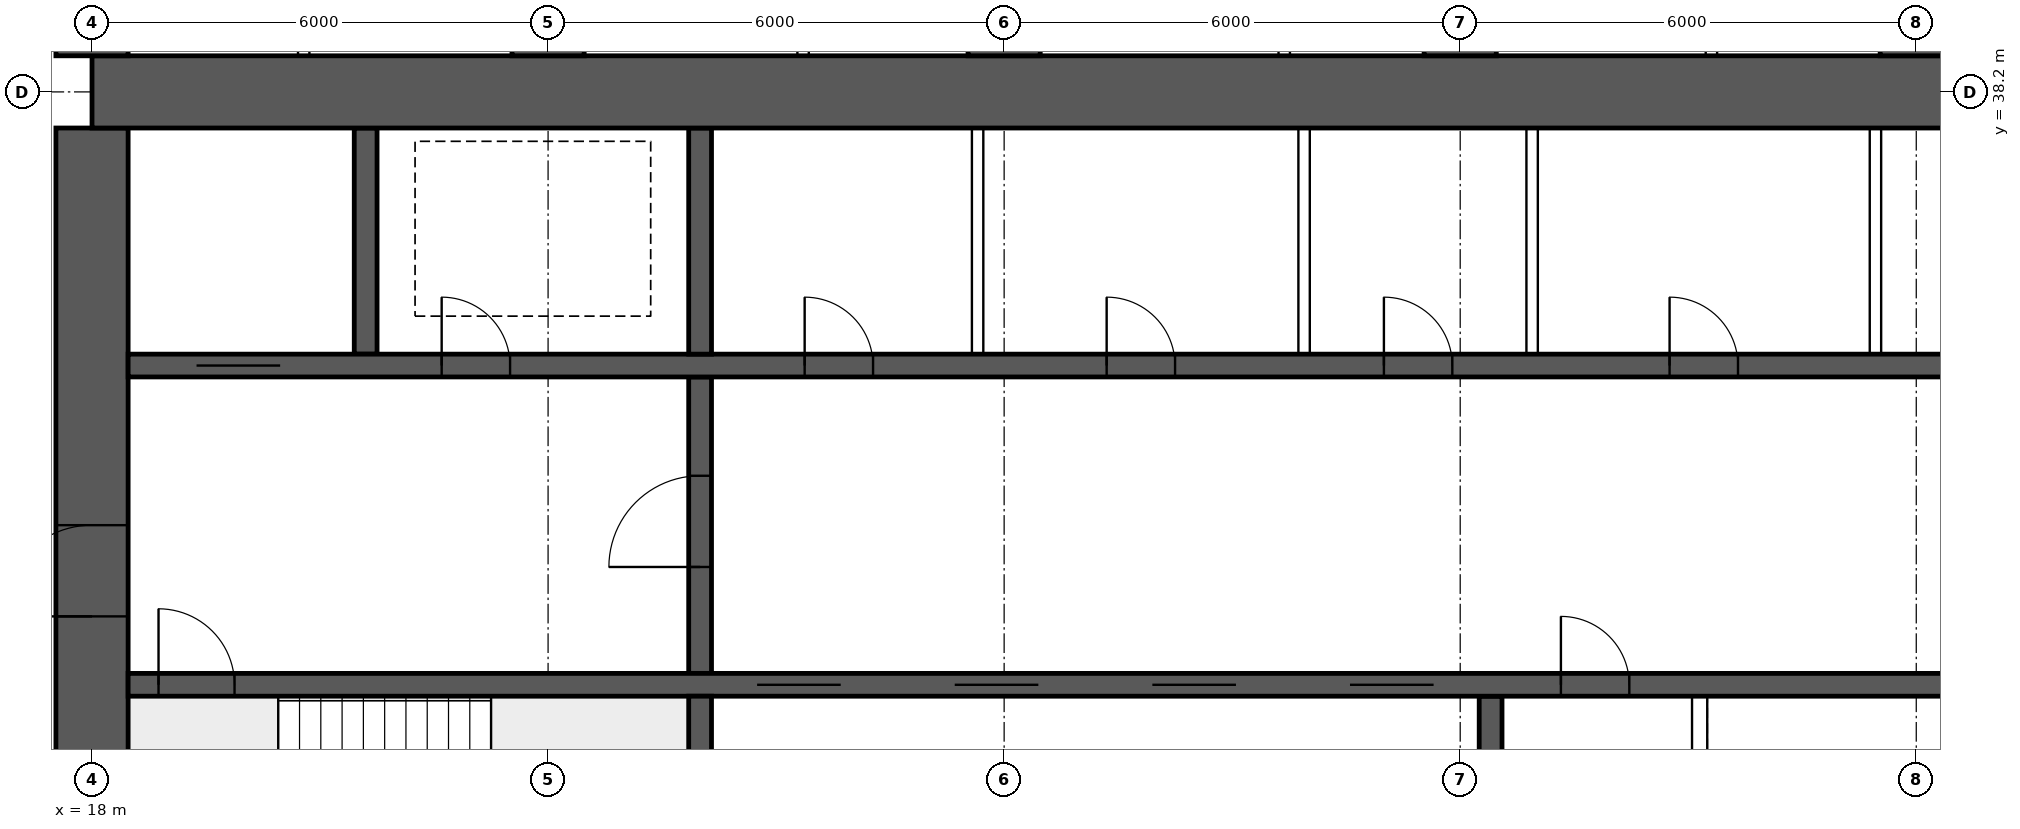
"""IFC4 building model, lengths in metres.
Left out: names, types, materials, properties, quantities, classifications, styles, units other than length and angle.
Written with IfcOpenShell. Run it as: python <this file> out.ifc"""

import sys

from ifc_helpers import new_model, si_unit, direction, frame, frame_2d, origin, place, context, subcontext, project, spatial, rectangle, extrude, element, fill, save


model = new_model("IFC4")
c1 = context("Model", 3, precision=1e-05, world=origin(), true_north=direction((0.0, 1.0)))
c2 = subcontext(c1, "Body", "Model", "MODEL_VIEW")
j1 = project(units=[si_unit("LENGTHUNIT", "METRE"), si_unit("PLANEANGLEUNIT", "RADIAN")], contexts=[c1])
p1 = place(None, origin())
s1 = spatial("IfcSite", under=j1, at=p1, CompositionType="ELEMENT")
p2 = place(p1, origin())
s2 = spatial("IfcBuilding", under=s1, at=p2, CompositionType="ELEMENT")
p3 = place(p2, frame((0.0, 0.0, 121.9)))
s3 = spatial("IfcBuildingStorey", under=s2, at=p3, CompositionType="ELEMENT", Elevation=121.9)
p4 = place(p3, frame((18.0, 38.2, 0.0), z_axis=(0.0, 0.0, 1.0), x_axis=(1.0, 0.0, 0.0)))
e1 = element("IfcWall", 1, at=p4, inside=s3, PredefinedType="SHEAR", context=c2, shape_type="SweptSolid", body=[
    extrude(rectangle(XDim=48.0, YDim=0.95, at=frame_2d((24.0, 0.0))), origin(), (0.0, 0.0, 1.0), 3.75),
])
p5 = place(p3, frame((18.0, 26.275, 0.0), z_axis=(0.0, 0.0, 1.0), x_axis=(0.0, 1.0, 0.0)))
e2 = element("IfcWall", 2, at=p5, inside=s3, PredefinedType="SHEAR", context=c2, shape_type="SweptSolid", body=[
    extrude(rectangle(XDim=11.45, YDim=0.95, at=frame_2d((5.725, 0.0))), origin(), (0.0, 0.0, 1.0), 3.75),
])
p6 = place(p5, frame((5.025, 0.0, 0.0)))
e3 = element("IfcOpeningElement", 3, at=p6, cuts=e2, PredefinedType="OPENING", context=c2, shape_type="SweptSolid", body=[
    extrude(rectangle(XDim=1.2, YDim=2.1, at=frame_2d((0.6, 1.05))), frame((0.0, 0.485, 0.0), z_axis=(0.0, -1.0, 0.0), x_axis=(1.0, 0.0, 0.0)), (0.0, 0.0, 1.0), 0.97),
])
p7 = place(p3, frame((18.475, 30.4, 0.0), z_axis=(0.0, 0.0, 1.0), x_axis=(1.0, 0.0, 0.0)))
e4 = element("IfcWall", 4, at=p7, inside=s3, PredefinedType="SHEAR", context=c2, shape_type="SweptSolid", body=[
    extrude(rectangle(XDim=47.05, YDim=0.3, at=frame_2d((23.525, 0.0))), origin(), (0.0, 0.0, 1.0), 3.75),
])
p8 = place(p7, frame((0.4, 0.0, 0.0)))
e5 = element("IfcOpeningElement", 5, at=p8, cuts=e4, PredefinedType="OPENING", context=c2, shape_type="SweptSolid", body=[
    extrude(rectangle(XDim=1.0, YDim=2.1, at=frame_2d((0.5, 1.05))), frame((0.0, 0.16, 0.0), z_axis=(0.0, -1.0, 0.0), x_axis=(1.0, 0.0, 0.0)), (0.0, 0.0, 1.0), 0.32),
])
p9 = place(p7, frame((45.65, 0.0, 0.0)))
e6 = element("IfcOpeningElement", 6, at=p9, cuts=e4, PredefinedType="OPENING", context=c2, shape_type="SweptSolid", body=[
    extrude(rectangle(XDim=1.0, YDim=2.1, at=frame_2d((0.5, 1.05))), frame((0.0, 0.16, 0.0), z_axis=(0.0, -1.0, 0.0), x_axis=(1.0, 0.0, 0.0)), (0.0, 0.0, 1.0), 0.32),
])
p10 = place(p7, frame((8.275, 0.0, 0.0)))
e7 = element("IfcOpeningElement", 7, at=p10, cuts=e4, PredefinedType="OPENING", context=c2, shape_type="SweptSolid", body=[
    extrude(rectangle(XDim=1.1, YDim=2.1, at=frame_2d((0.55, 1.05))), frame((0.0, 0.16, 0.0), z_axis=(0.0, -1.0, 0.0), x_axis=(1.0, 0.0, 0.0)), (0.0, 0.0, 1.0), 0.32),
])
p11 = place(p7, frame((10.875, 0.0, 0.0)))
e8 = element("IfcOpeningElement", 8, at=p11, cuts=e4, PredefinedType="OPENING", context=c2, shape_type="SweptSolid", body=[
    extrude(rectangle(XDim=1.1, YDim=2.1, at=frame_2d((0.55, 1.05))), frame((0.0, 0.16, 0.0), z_axis=(0.0, -1.0, 0.0), x_axis=(1.0, 0.0, 0.0)), (0.0, 0.0, 1.0), 0.32),
])
p12 = place(p7, frame((13.475, 0.0, 0.0)))
e9 = element("IfcOpeningElement", 9, at=p12, cuts=e4, PredefinedType="OPENING", context=c2, shape_type="SweptSolid", body=[
    extrude(rectangle(XDim=1.1, YDim=2.1, at=frame_2d((0.55, 1.05))), frame((0.0, 0.16, 0.0), z_axis=(0.0, -1.0, 0.0), x_axis=(1.0, 0.0, 0.0)), (0.0, 0.0, 1.0), 0.32),
])
p13 = place(p7, frame((16.075, 0.0, 0.0)))
e10 = element("IfcOpeningElement", 10, at=p13, cuts=e4, PredefinedType="OPENING", context=c2, shape_type="SweptSolid", body=[
    extrude(rectangle(XDim=1.1, YDim=2.1, at=frame_2d((0.55, 1.05))), frame((0.0, 0.16, 0.0), z_axis=(0.0, -1.0, 0.0), x_axis=(1.0, 0.0, 0.0)), (0.0, 0.0, 1.0), 0.32),
])
p14 = place(p7, frame((18.85, 0.0, 0.0)))
e11 = element("IfcOpeningElement", 11, at=p14, cuts=e4, PredefinedType="OPENING", context=c2, shape_type="SweptSolid", body=[
    extrude(rectangle(XDim=0.9, YDim=2.1, at=frame_2d((0.45, 1.05))), frame((0.0, 0.16, 0.0), z_axis=(0.0, -1.0, 0.0), x_axis=(1.0, 0.0, 0.0)), (0.0, 0.0, 1.0), 0.32),
])
p15 = place(p7, frame((30.142, 0.0, 0.0)))
e12 = element("IfcOpeningElement", 12, at=p15, cuts=e4, PredefinedType="OPENING", context=c2, shape_type="SweptSolid", body=[
    extrude(rectangle(XDim=1.1, YDim=2.1, at=frame_2d((0.55, 1.05))), frame((0.0, 0.16, 0.0), z_axis=(0.0, -1.0, 0.0), x_axis=(1.0, 0.0, 0.0)), (0.0, 0.0, 1.0), 0.32),
])
p16 = place(p7, frame((33.675, 0.0, 0.0)))
e13 = element("IfcOpeningElement", 13, at=p16, cuts=e4, PredefinedType="OPENING", context=c2, shape_type="SweptSolid", body=[
    extrude(rectangle(XDim=1.1, YDim=2.1, at=frame_2d((0.55, 1.05))), frame((0.0, 0.16, 0.0), z_axis=(0.0, -1.0, 0.0), x_axis=(1.0, 0.0, 0.0)), (0.0, 0.0, 1.0), 0.32),
])
p17 = place(p7, frame((37.208, 0.0, 0.0)))
e14 = element("IfcOpeningElement", 14, at=p17, cuts=e4, PredefinedType="OPENING", context=c2, shape_type="SweptSolid", body=[
    extrude(rectangle(XDim=1.1, YDim=2.1, at=frame_2d((0.55, 1.05))), frame((0.0, 0.16, 0.0), z_axis=(0.0, -1.0, 0.0), x_axis=(1.0, 0.0, 0.0)), (0.0, 0.0, 1.0), 0.32),
])
p18 = place(p3, frame((18.475, 34.6, 0.0), z_axis=(0.0, 0.0, 1.0), x_axis=(1.0, 0.0, 0.0)))
e15 = element("IfcWall", 15, at=p18, inside=s3, PredefinedType="SHEAR", context=c2, shape_type="SweptSolid", body=[
    extrude(rectangle(XDim=47.05, YDim=0.3, at=frame_2d((23.525, 0.0))), origin(), (0.0, 0.0, 1.0), 3.75),
])
p19 = place(p18, frame((0.9, 0.0, 0.0)))
e16 = element("IfcOpeningElement", 16, at=p19, cuts=e15, PredefinedType="OPENING", context=c2, shape_type="SweptSolid", body=[
    extrude(rectangle(XDim=1.1, YDim=2.1, at=frame_2d((0.55, 1.05))), frame((0.0, 0.16, 0.0), z_axis=(0.0, -1.0, 0.0), x_axis=(1.0, 0.0, 0.0)), (0.0, 0.0, 1.0), 0.32),
])
p20 = place(p18, frame((45.05, 0.0, 0.0)))
e17 = element("IfcOpeningElement", 17, at=p20, cuts=e15, PredefinedType="OPENING", context=c2, shape_type="SweptSolid", body=[
    extrude(rectangle(XDim=1.1, YDim=2.1, at=frame_2d((0.55, 1.05))), frame((0.0, 0.16, 0.0), z_axis=(0.0, -1.0, 0.0), x_axis=(1.0, 0.0, 0.0)), (0.0, 0.0, 1.0), 0.32),
])
p21 = place(p18, frame((4.125, 0.0, 0.0)))
e18 = element("IfcOpeningElement", 18, at=p21, cuts=e15, PredefinedType="OPENING", context=c2, shape_type="SweptSolid", body=[
    extrude(rectangle(XDim=0.9, YDim=2.1, at=frame_2d((0.45, 1.05))), frame((0.0, 0.16, 0.0), z_axis=(0.0, -1.0, 0.0), x_axis=(1.0, 0.0, 0.0)), (0.0, 0.0, 1.0), 0.32),
])
p22 = place(p18, frame((42.025, 0.0, 0.0)))
e19 = element("IfcOpeningElement", 19, at=p22, cuts=e15, PredefinedType="OPENING", context=c2, shape_type="SweptSolid", body=[
    extrude(rectangle(XDim=0.9, YDim=2.1, at=frame_2d((0.45, 1.05))), frame((0.0, 0.16, 0.0), z_axis=(0.0, -1.0, 0.0), x_axis=(1.0, 0.0, 0.0)), (0.0, 0.0, 1.0), 0.32),
])
p23 = place(p18, frame((8.9, 0.0, 0.0)))
e20 = element("IfcOpeningElement", 20, at=p23, cuts=e15, PredefinedType="OPENING", context=c2, shape_type="SweptSolid", body=[
    extrude(rectangle(XDim=0.9, YDim=2.1, at=frame_2d((0.45, 1.05))), frame((0.0, 0.16, 0.0), z_axis=(0.0, -1.0, 0.0), x_axis=(1.0, 0.0, 0.0)), (0.0, 0.0, 1.0), 0.32),
])
p24 = place(p18, frame((12.874, 0.0, 0.0)))
e21 = element("IfcOpeningElement", 21, at=p24, cuts=e15, PredefinedType="OPENING", context=c2, shape_type="SweptSolid", body=[
    extrude(rectangle(XDim=0.9, YDim=2.1, at=frame_2d((0.45, 1.05))), frame((0.0, 0.16, 0.0), z_axis=(0.0, -1.0, 0.0), x_axis=(1.0, 0.0, 0.0)), (0.0, 0.0, 1.0), 0.32),
])
p25 = place(p18, frame((16.521, 0.0, 0.0)))
e22 = element("IfcOpeningElement", 22, at=p25, cuts=e15, PredefinedType="OPENING", context=c2, shape_type="SweptSolid", body=[
    extrude(rectangle(XDim=0.9, YDim=2.1, at=frame_2d((0.45, 1.05))), frame((0.0, 0.16, 0.0), z_axis=(0.0, -1.0, 0.0), x_axis=(1.0, 0.0, 0.0)), (0.0, 0.0, 1.0), 0.32),
])
p26 = place(p18, frame((20.28, 0.0, 0.0)))
e23 = element("IfcOpeningElement", 23, at=p26, cuts=e15, PredefinedType="OPENING", context=c2, shape_type="SweptSolid", body=[
    extrude(rectangle(XDim=0.9, YDim=2.1, at=frame_2d((0.45, 1.05))), frame((0.0, 0.16, 0.0), z_axis=(0.0, -1.0, 0.0), x_axis=(1.0, 0.0, 0.0)), (0.0, 0.0, 1.0), 0.32),
])
p27 = place(p18, frame((24.686, 0.0, 0.0)))
e24 = element("IfcOpeningElement", 24, at=p27, cuts=e15, PredefinedType="OPENING", context=c2, shape_type="SweptSolid", body=[
    extrude(rectangle(XDim=0.9, YDim=2.1, at=frame_2d((0.45, 1.05))), frame((0.0, 0.16, 0.0), z_axis=(0.0, -1.0, 0.0), x_axis=(1.0, 0.0, 0.0)), (0.0, 0.0, 1.0), 0.32),
])
p28 = place(p18, frame((27.483, 0.0, 0.0)))
e25 = element("IfcOpeningElement", 25, at=p28, cuts=e15, PredefinedType="OPENING", context=c2, shape_type="SweptSolid", body=[
    extrude(rectangle(XDim=0.9, YDim=2.1, at=frame_2d((0.45, 1.05))), frame((0.0, 0.16, 0.0), z_axis=(0.0, -1.0, 0.0), x_axis=(1.0, 0.0, 0.0)), (0.0, 0.0, 1.0), 0.32),
])
p29 = place(p18, frame((29.45, 0.0, 0.0)))
e26 = element("IfcOpeningElement", 26, at=p29, cuts=e15, PredefinedType="OPENING", context=c2, shape_type="SweptSolid", body=[
    extrude(rectangle(XDim=0.9, YDim=2.1, at=frame_2d((0.45, 1.05))), frame((0.0, 0.16, 0.0), z_axis=(0.0, -1.0, 0.0), x_axis=(1.0, 0.0, 0.0)), (0.0, 0.0, 1.0), 0.32),
])
p30 = place(p18, frame((31.882, 0.0, 0.0)))
e27 = element("IfcOpeningElement", 27, at=p30, cuts=e15, PredefinedType="OPENING", context=c2, shape_type="SweptSolid", body=[
    extrude(rectangle(XDim=0.9, YDim=2.1, at=frame_2d((0.45, 1.05))), frame((0.0, 0.16, 0.0), z_axis=(0.0, -1.0, 0.0), x_axis=(1.0, 0.0, 0.0)), (0.0, 0.0, 1.0), 0.32),
])
p31 = place(p18, frame((34.617, 0.0, 0.0)))
e28 = element("IfcOpeningElement", 28, at=p31, cuts=e15, PredefinedType="OPENING", context=c2, shape_type="SweptSolid", body=[
    extrude(rectangle(XDim=0.9, YDim=2.1, at=frame_2d((0.45, 1.05))), frame((0.0, 0.16, 0.0), z_axis=(0.0, -1.0, 0.0), x_axis=(1.0, 0.0, 0.0)), (0.0, 0.0, 1.0), 0.32),
])
p32 = place(p18, frame((37.656, 0.0, 0.0)))
e29 = element("IfcOpeningElement", 29, at=p32, cuts=e15, PredefinedType="OPENING", context=c2, shape_type="SweptSolid", body=[
    extrude(rectangle(XDim=0.9, YDim=2.1, at=frame_2d((0.45, 1.05))), frame((0.0, 0.16, 0.0), z_axis=(0.0, -1.0, 0.0), x_axis=(1.0, 0.0, 0.0)), (0.0, 0.0, 1.0), 0.32),
])
p33 = place(p3, frame((26.0, 26.275, 0.0), z_axis=(0.0, 0.0, 1.0), x_axis=(0.0, 1.0, 0.0)))
e30 = element("IfcWall", 30, at=p33, inside=s3, PredefinedType="SHEAR", context=c2, shape_type="SweptSolid", body=[
    extrude(rectangle(XDim=3.975, YDim=0.3, at=frame_2d((1.988, 0.0))), origin(), (0.0, 0.0, 1.0), 3.75),
])
p34 = place(p3, frame((26.0, 30.55, 0.0), z_axis=(0.0, 0.0, 1.0), x_axis=(0.0, 1.0, 0.0)))
e31 = element("IfcWall", 31, at=p34, inside=s3, PredefinedType="SHEAR", context=c2, shape_type="SweptSolid", body=[
    extrude(rectangle(XDim=3.9, YDim=0.3, at=frame_2d((1.95, 0.0))), origin(), (0.0, 0.0, 1.0), 3.75),
])
p35 = place(p34, frame((1.4, 0.0, 0.0)))
e32 = element("IfcOpeningElement", 32, at=p35, cuts=e31, PredefinedType="OPENING", context=c2, shape_type="SweptSolid", body=[
    extrude(rectangle(XDim=1.2, YDim=2.1, at=frame_2d((0.6, 1.05))), frame((0.0, 0.16, 0.0), z_axis=(0.0, -1.0, 0.0), x_axis=(1.0, 0.0, 0.0)), (0.0, 0.0, 1.0), 0.32),
])
for number, where, z_axis, x_axis in (
    (33, (21.6, 34.75, 0.0), (0.0, 0.0, 1.0), (0.0, 1.0, 0.0)),
    (34, (26.0, 34.75, 0.0), (0.0, 0.0, 1.0), (0.0, 1.0, 0.0)),
):
    element("IfcWall", number, at=place(p3, frame(where, z_axis=z_axis, x_axis=x_axis)), inside=s3, PredefinedType="SHEAR", context=c2, shape_type="SweptSolid", body=[
        extrude(rectangle(XDim=2.975, YDim=0.3, at=frame_2d((1.488, 0.0))), origin(), (0.0, 0.0, 1.0), 3.75),
    ])
p36 = place(p3, frame((36.4, 26.275, 0.0), z_axis=(0.0, 0.0, 1.0), x_axis=(0.0, 1.0, 0.0)))
e35 = element("IfcWall", 35, at=p36, inside=s3, PredefinedType="SHEAR", context=c2, shape_type="SweptSolid", body=[
    extrude(rectangle(XDim=3.975, YDim=0.3, at=frame_2d((1.988, 0.0))), origin(), (0.0, 0.0, 1.0), 3.75),
])
for number, where, z_axis, x_axis in (
    (36, (18.0, 38.675, 0.0), (0.0, 0.0, 1.0), (0.0, 1.0, 0.0)),
    (37, (24.0, 38.675, 0.0), (0.0, 0.0, 1.0), (0.0, 1.0, 0.0)),
    (38, (30.0, 38.675, 0.0), (0.0, 0.0, 1.0), (0.0, 1.0, 0.0)),
    (39, (36.0, 38.675, 0.0), (0.0, 0.0, 1.0), (0.0, 1.0, 0.0)),
    (40, (42.0, 38.675, 0.0), (0.0, 0.0, 1.0), (0.0, 1.0, 0.0)),
):
    element("IfcWall", number, at=place(p3, frame(where, z_axis=z_axis, x_axis=x_axis)), inside=s3, PredefinedType="SHEAR", context=c2, shape_type="SweptSolid", body=[
        extrude(rectangle(XDim=9.325, YDim=0.95, at=frame_2d((4.663, 0.0))), origin(), (0.0, 0.0, 1.0), 3.75),
    ])
for number, where, z_axis, x_axis in (
    (41, (29.651, 34.75, 0.0), (0.0, 0.0, 1.0), (0.0, 1.0, 0.0)),
    (42, (33.946, 34.75, 0.0), (0.0, 0.0, 1.0), (0.0, 1.0, 0.0)),
    (43, (36.946, 34.75, 0.0), (0.0, 0.0, 1.0), (0.0, 1.0, 0.0)),
    (44, (41.463, 34.75, 0.0), (0.0, 0.0, 1.0), (0.0, 1.0, 0.0)),
):
    element("IfcWall", number, at=place(p3, frame(where, z_axis=z_axis, x_axis=x_axis)), inside=s3, PredefinedType="SOLIDWALL", context=c2, shape_type="SweptSolid", body=[
        extrude(rectangle(XDim=2.975, YDim=0.15, at=frame_2d((1.488, 0.0))), origin(), (0.0, 0.0, 1.0), 3.5),
    ])
p37 = place(p3, frame((39.15, 26.275, 0.0), z_axis=(0.0, 0.0, 1.0), x_axis=(0.0, 1.0, 0.0)))
e45 = element("IfcWall", 45, at=p37, inside=s3, PredefinedType="SOLIDWALL", context=c2, shape_type="SweptSolid", body=[
    extrude(rectangle(XDim=3.975, YDim=0.2, at=frame_2d((1.988, 0.0))), origin(), (0.0, 0.0, 1.0), 3.5),
])
for number, where, z_axis, x_axis in (
    (46, (20.785, 38.675, 0.0), (0.0, 0.0, 1.0), (0.0, 1.0, 0.0)),
    (47, (27.355, 38.675, 0.0), (0.0, 0.0, 1.0), (0.0, 1.0, 0.0)),
    (48, (33.685, 38.675, 0.0), (0.0, 0.0, 1.0), (0.0, 1.0, 0.0)),
    (49, (39.305, 38.675, 0.0), (0.0, 0.0, 1.0), (0.0, 1.0, 0.0)),
):
    element("IfcWall", number, at=place(p3, frame(where, z_axis=z_axis, x_axis=x_axis)), inside=s3, PredefinedType="PARTITIONING", context=c2, shape_type="SweptSolid", body=[
        extrude(rectangle(XDim=9.225, YDim=0.15, at=frame_2d((4.612, 0.0))), origin(), (0.0, 0.0, 1.0), 3.5),
    ])
p38 = place(p6, origin())
e50 = element("IfcDoor", 50, at=p38, inside=s3, OperationType="SINGLE_SWING_LEFT", PredefinedType="DOOR", context=c2, shape_type="SweptSolid", body=[
    extrude(rectangle(XDim=1.2, YDim=2.1, at=frame_2d((0.6, 1.05))), frame((0.0, 0.025, 0.0), z_axis=(0.0, -1.0, 0.0), x_axis=(1.0, 0.0, 0.0)), (0.0, 0.0, 1.0), 0.05),
])
fill(e3, e50)
p39 = place(p8, origin())
e51 = element("IfcDoor", 51, at=p39, inside=s3, OperationType="SINGLE_SWING_LEFT", PredefinedType="DOOR", context=c2, shape_type="SweptSolid", body=[
    extrude(rectangle(XDim=1.0, YDim=2.1, at=frame_2d((0.5, 1.05))), frame((0.0, 0.025, 0.0), z_axis=(0.0, -1.0, 0.0), x_axis=(1.0, 0.0, 0.0)), (0.0, 0.0, 1.0), 0.05),
])
fill(e5, e51)
p40 = place(p19, origin())
e52 = element("IfcDoor", 52, at=p40, inside=s3, OperationType="DOUBLE_DOOR_SLIDING", PredefinedType="DOOR", context=c2, shape_type="SweptSolid", body=[
    extrude(rectangle(XDim=1.1, YDim=2.1, at=frame_2d((0.55, 1.05))), frame((0.0, 0.025, 0.0), z_axis=(0.0, -1.0, 0.0), x_axis=(1.0, 0.0, 0.0)), (0.0, 0.0, 1.0), 0.05),
])
fill(e16, e52)
p41 = place(p21, origin())
e53 = element("IfcDoor", 53, at=p41, inside=s3, OperationType="SINGLE_SWING_LEFT", PredefinedType="DOOR", context=c2, shape_type="SweptSolid", body=[
    extrude(rectangle(XDim=0.9, YDim=2.1, at=frame_2d((0.45, 1.05))), frame((0.0, 0.025, 0.0), z_axis=(0.0, -1.0, 0.0), x_axis=(1.0, 0.0, 0.0)), (0.0, 0.0, 1.0), 0.05),
])
fill(e18, e53)
p42 = place(p35, origin())
e54 = element("IfcDoor", 54, at=p42, inside=s3, OperationType="SINGLE_SWING_LEFT", PredefinedType="DOOR", context=c2, shape_type="SweptSolid", body=[
    extrude(rectangle(XDim=1.2, YDim=2.1, at=frame_2d((0.6, 1.05))), frame((0.0, 0.025, 0.0), z_axis=(0.0, -1.0, 0.0), x_axis=(1.0, 0.0, 0.0)), (0.0, 0.0, 1.0), 0.05),
])
fill(e32, e54)
p43 = place(p23, origin())
e55 = element("IfcDoor", 55, at=p43, inside=s3, OperationType="SINGLE_SWING_LEFT", PredefinedType="DOOR", context=c2, shape_type="SweptSolid", body=[
    extrude(rectangle(XDim=0.9, YDim=2.1, at=frame_2d((0.45, 1.05))), frame((0.0, 0.025, 0.0), z_axis=(0.0, -1.0, 0.0), x_axis=(1.0, 0.0, 0.0)), (0.0, 0.0, 1.0), 0.05),
])
fill(e20, e55)
p44 = place(p24, origin())
e56 = element("IfcDoor", 56, at=p44, inside=s3, OperationType="SINGLE_SWING_LEFT", PredefinedType="DOOR", context=c2, shape_type="SweptSolid", body=[
    extrude(rectangle(XDim=0.9, YDim=2.1, at=frame_2d((0.45, 1.05))), frame((0.0, 0.025, 0.0), z_axis=(0.0, -1.0, 0.0), x_axis=(1.0, 0.0, 0.0)), (0.0, 0.0, 1.0), 0.05),
])
fill(e21, e56)
p45 = place(p25, origin())
e57 = element("IfcDoor", 57, at=p45, inside=s3, OperationType="SINGLE_SWING_LEFT", PredefinedType="DOOR", context=c2, shape_type="SweptSolid", body=[
    extrude(rectangle(XDim=0.9, YDim=2.1, at=frame_2d((0.45, 1.05))), frame((0.0, 0.025, 0.0), z_axis=(0.0, -1.0, 0.0), x_axis=(1.0, 0.0, 0.0)), (0.0, 0.0, 1.0), 0.05),
])
fill(e22, e57)
p46 = place(p26, origin())
e58 = element("IfcDoor", 58, at=p46, inside=s3, OperationType="SINGLE_SWING_LEFT", PredefinedType="DOOR", context=c2, shape_type="SweptSolid", body=[
    extrude(rectangle(XDim=0.9, YDim=2.1, at=frame_2d((0.45, 1.05))), frame((0.0, 0.025, 0.0), z_axis=(0.0, -1.0, 0.0), x_axis=(1.0, 0.0, 0.0)), (0.0, 0.0, 1.0), 0.05),
])
fill(e23, e58)
p47 = place(p10, origin())
e59 = element("IfcDoor", 59, at=p47, inside=s3, OperationType="DOUBLE_DOOR_SLIDING", PredefinedType="DOOR", context=c2, shape_type="SweptSolid", body=[
    extrude(rectangle(XDim=1.1, YDim=2.1, at=frame_2d((0.55, 1.05))), frame((0.0, 0.025, 0.0), z_axis=(0.0, -1.0, 0.0), x_axis=(1.0, 0.0, 0.0)), (0.0, 0.0, 1.0), 0.05),
])
fill(e7, e59)
p48 = place(p11, origin())
e60 = element("IfcDoor", 60, at=p48, inside=s3, OperationType="DOUBLE_DOOR_SLIDING", PredefinedType="DOOR", context=c2, shape_type="SweptSolid", body=[
    extrude(rectangle(XDim=1.1, YDim=2.1, at=frame_2d((0.55, 1.05))), frame((0.0, 0.025, 0.0), z_axis=(0.0, -1.0, 0.0), x_axis=(1.0, 0.0, 0.0)), (0.0, 0.0, 1.0), 0.05),
])
fill(e8, e60)
p49 = place(p12, origin())
e61 = element("IfcDoor", 61, at=p49, inside=s3, OperationType="DOUBLE_DOOR_SLIDING", PredefinedType="DOOR", context=c2, shape_type="SweptSolid", body=[
    extrude(rectangle(XDim=1.1, YDim=2.1, at=frame_2d((0.55, 1.05))), frame((0.0, 0.025, 0.0), z_axis=(0.0, -1.0, 0.0), x_axis=(1.0, 0.0, 0.0)), (0.0, 0.0, 1.0), 0.05),
])
fill(e9, e61)
p50 = place(p13, origin())
e62 = element("IfcDoor", 62, at=p50, inside=s3, OperationType="DOUBLE_DOOR_SLIDING", PredefinedType="DOOR", context=c2, shape_type="SweptSolid", body=[
    extrude(rectangle(XDim=1.1, YDim=2.1, at=frame_2d((0.55, 1.05))), frame((0.0, 0.025, 0.0), z_axis=(0.0, -1.0, 0.0), x_axis=(1.0, 0.0, 0.0)), (0.0, 0.0, 1.0), 0.05),
])
fill(e10, e62)
p51 = place(p14, origin())
e63 = element("IfcDoor", 63, at=p51, inside=s3, OperationType="SINGLE_SWING_LEFT", PredefinedType="DOOR", context=c2, shape_type="SweptSolid", body=[
    extrude(rectangle(XDim=0.9, YDim=2.1, at=frame_2d((0.45, 1.05))), frame((0.0, 0.025, 0.0), z_axis=(0.0, -1.0, 0.0), x_axis=(1.0, 0.0, 0.0)), (0.0, 0.0, 1.0), 0.05),
])
fill(e11, e63)
save(model, sys.argv[1])
